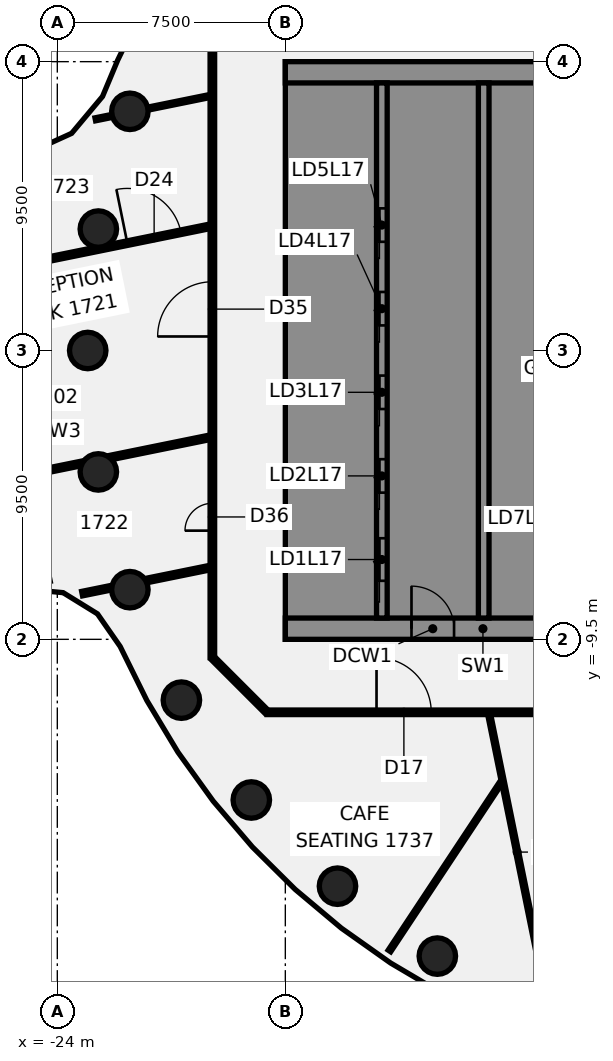
"""IFC4 building model, lengths in metres.
Left out: names, types, materials, properties, quantities, classifications, styles, units other than length and angle.
Written with IfcOpenShell. Run it as: python <this file> out.ifc"""

import sys

from ifc_helpers import new_model, si_unit, direction, frame, frame_2d, origin, origin_2d, place, context, subcontext, project, spatial, polyline, rectangle, circle, outline, extrude, element, fill, save


model = new_model("IFC4")
c1 = context("Model", 3, precision=1e-05, world=origin(), true_north=direction((0.0, 1.0)))
c2 = subcontext(c1, "Body", "Model", "MODEL_VIEW")
j1 = project(units=[si_unit("LENGTHUNIT", "METRE"), si_unit("PLANEANGLEUNIT", "RADIAN")], contexts=[c1])
p1 = place(None, origin())
s1 = spatial("IfcSite", under=j1, at=p1, CompositionType="ELEMENT")
p2 = place(p1, origin())
s2 = spatial("IfcBuilding", under=s1, at=p2, CompositionType="ELEMENT")
p3 = place(p2, frame((0.0, 0.0, 75.25)))
s3 = spatial("IfcBuildingStorey", under=s2, at=p3, CompositionType="ELEMENT", Elevation=75.25)
for number, where, z_axis, x_axis in (
    (1, (-21.613, 7.866, -0.14), (0.0, 0.0, 1.0), (1.0, 0.0, 0.0)),
    (2, (-22.651, 3.994, -0.14), (0.0, 0.0, 1.0), (1.0, 0.0, 0.0)),
    (3, (-23.0, 0.0, -0.14), (0.0, 0.0, 1.0), (1.0, 0.0, 0.0)),
    (4, (-22.651, -3.994, -0.14), (0.0, 0.0, 1.0), (1.0, 0.0, 0.0)),
    (5, (-21.613, -7.866, -0.14), (0.0, 0.0, 1.0), (1.0, 0.0, 0.0)),
    (6, (-19.919, -11.5, -0.14), (0.0, 0.0, 1.0), (1.0, 0.0, 0.0)),
    (7, (-17.619, -14.784, -0.14), (0.0, 0.0, 1.0), (1.0, 0.0, 0.0)),
    (8, (-14.784, -17.619, -0.14), (0.0, 0.0, 1.0), (1.0, 0.0, 0.0)),
    (9, (-11.5, -19.919, -0.14), (0.0, 0.0, 1.0), (1.0, 0.0, 0.0)),
):
    element("IfcColumn", number, at=place(p3, frame(where, z_axis=z_axis, x_axis=x_axis)), inside=s3, PredefinedType="COLUMN", context=c2, shape_type="SweptSolid", body=[
        extrude(circle(Radius=0.6, at=origin_2d()), origin(), (0.0, 0.0, 1.0), 3.71),
    ])
p4 = place(p3, frame((-9.795, -11.969, 0.0), z_axis=(0.0, 0.0, 1.0), x_axis=(0.199208554459, -0.979957117342, 0.0)))
e10 = element("IfcWall", 10, at=p4, inside=s3, PredefinedType="PARTITIONING", context=c2, shape_type="SweptSolid", body=[
    extrude(rectangle(XDim=9.243, YDim=0.1, at=frame_2d((4.622, 0.0))), origin(), (0.0, 0.0, 1.0), 2.97),
])
p5 = place(p3, frame((-18.872, -10.128, 0.0), z_axis=(0.0, 0.0, 1.0), x_axis=(0.707106781187, -0.707106781187, 0.0)))
e11 = element("IfcWall", 11, at=p5, inside=s3, PredefinedType="PARTITIONING", context=c2, shape_type="SweptSolid", body=[
    extrude(rectangle(XDim=2.465, YDim=0.15, at=frame_2d((1.232, 0.0))), origin(), (0.0, 0.0, 1.0), 2.97),
])
p6 = place(p3, frame((-17.1, -11.9, 0.0), z_axis=(0.0, 0.0, 1.0), x_axis=(1.0, 0.0, 0.0)))
e12 = element("IfcWall", 12, at=p6, inside=s3, PredefinedType="PARTITIONING", context=c2, shape_type="SweptSolid", body=[
    extrude(rectangle(XDim=34.165, YDim=0.15, at=frame_2d((17.083, 0.0))), origin(), (0.0, 0.0, 1.0), 2.97),
])
p7 = place(p6, frame((14.127, 0.0, 0.0)))
e13 = element("IfcOpeningElement", 13, at=p7, cuts=e12, PredefinedType="OPENING", context=c2, shape_type="SweptSolid", body=[
    extrude(rectangle(XDim=1.8, YDim=2.1, at=frame_2d((0.9, 1.05))), frame((0.0, 0.085, 0.0), z_axis=(0.0, -1.0, 0.0), x_axis=(1.0, 0.0, 0.0)), (0.0, 0.0, 1.0), 0.17),
])
p8 = place(p6, frame((3.6, 0.0, 0.0)))
e14 = element("IfcOpeningElement", 14, at=p8, cuts=e12, PredefinedType="OPENING", context=c2, shape_type="SweptSolid", body=[
    extrude(rectangle(XDim=1.8, YDim=2.1, at=frame_2d((0.9, 1.05))), frame((0.0, 0.085, 0.0), z_axis=(0.0, -1.0, 0.0), x_axis=(1.0, 0.0, 0.0)), (0.0, 0.0, 1.0), 0.17),
])
p9 = place(p6, frame((27.452, 0.0, 0.0)))
e15 = element("IfcOpeningElement", 15, at=p9, cuts=e12, PredefinedType="OPENING", context=c2, shape_type="SweptSolid", body=[
    extrude(rectangle(XDim=1.8, YDim=2.1, at=frame_2d((0.9, 1.05))), frame((0.0, 0.085, 0.0), z_axis=(0.0, -1.0, 0.0), x_axis=(1.0, 0.0, 0.0)), (0.0, 0.0, 1.0), 0.17),
])
p10 = place(p3, frame((-26.303, 2.595, 0.0), z_axis=(0.0, 0.0, 1.0), x_axis=(0.979950490728, 0.19924114967, 0.0)))
e16 = element("IfcWall", 16, at=p10, inside=s3, PredefinedType="PARTITIONING", context=c2, shape_type="SweptSolid", body=[
    extrude(rectangle(XDim=7.479, YDim=0.15, at=frame_2d((3.74, 0.0))), origin(), (0.0, 0.0, 1.0), 2.87),
])
p11 = place(p10, frame((4.7, 0.0, 0.0)))
e17 = element("IfcOpeningElement", 17, at=p11, cuts=e16, PredefinedType="OPENING", context=c2, shape_type="SweptSolid", body=[
    extrude(rectangle(XDim=1.8, YDim=2.1, at=frame_2d((0.9, 1.05))), frame((0.0, 0.085, 0.0), z_axis=(0.0, -1.0, 0.0), x_axis=(1.0, 0.0, 0.0)), (0.0, 0.0, 1.0), 0.17),
])
p12 = place(p3, frame((-24.948, -4.069, 0.0), z_axis=(0.0, 0.0, 1.0), x_axis=(0.979938907772, 0.199298110967, 0.0)))
e18 = element("IfcWall", 18, at=p12, inside=s3, PredefinedType="PARTITIONING", context=c2, shape_type="SweptSolid", body=[
    extrude(rectangle(XDim=1.8, YDim=0.15, at=frame_2d((0.9, 0.0))), origin(), (0.0, 0.0, 1.0), 2.87),
])
p13 = place(p3, frame((-22.284, -3.527, 0.0), z_axis=(0.0, 0.0, 1.0), x_axis=(0.979950296152, 0.199242106673, 0.0)))
e19 = element("IfcWall", 19, at=p13, inside=s3, PredefinedType="PARTITIONING", context=c2, shape_type="SweptSolid", body=[
    extrude(rectangle(XDim=3.378, YDim=0.15, at=frame_2d((1.689, 0.0))), origin(), (0.0, 0.0, 1.0), 2.97),
])
p14 = place(p3, frame((-22.751, 7.603, 0.0), z_axis=(0.0, 0.0, 1.0), x_axis=(0.980025828953, 0.1988702456, 0.0)))
e20 = element("IfcWall", 20, at=p14, inside=s3, PredefinedType="PARTITIONING", context=c2, shape_type="SweptSolid", body=[
    extrude(rectangle(XDim=0.579, YDim=0.1, at=frame_2d((0.29, 0.0))), origin(), (0.0, 0.0, 1.0), 2.97),
])
p15 = place(p3, frame((-21.026, 7.954, 0.0), z_axis=(0.0, 0.0, 1.0), x_axis=(0.979967824394, 0.19915587652, 0.0)))
e21 = element("IfcWall", 21, at=p15, inside=s3, PredefinedType="PARTITIONING", context=c2, shape_type="SweptSolid", body=[
    extrude(rectangle(XDim=2.1, YDim=0.1, at=frame_2d((1.05, 0.0))), origin(), (0.0, 0.0, 1.0), 2.97),
])
p16 = place(p3, frame((-23.185, -7.997, 0.0), z_axis=(0.0, 0.0, 1.0), x_axis=(0.979965738982, 0.199166137736, 0.0)))
e22 = element("IfcWall", 22, at=p16, inside=s3, PredefinedType="PARTITIONING", context=c2, shape_type="SweptSolid", body=[
    extrude(rectangle(XDim=1.0, YDim=0.15, at=frame_2d((0.5, 0.0))), origin(), (0.0, 0.0, 1.0), 2.97),
])
p17 = place(p3, frame((-21.083, -7.569, 0.0), z_axis=(0.0, 0.0, 1.0), x_axis=(0.979916380724, 0.199408843305, 0.0)))
e23 = element("IfcWall", 23, at=p17, inside=s3, PredefinedType="PARTITIONING", context=c2, shape_type="SweptSolid", body=[
    extrude(rectangle(XDim=2.152, YDim=0.15, at=frame_2d((1.076, 0.0))), origin(), (0.0, 0.0, 1.0), 2.97),
])
p18 = place(p3, frame((-13.076, -19.75, 0.0), z_axis=(0.0, 0.0, 1.0), x_axis=(0.552134654266, 0.833754954144, 0.0)))
e24 = element("IfcWall", 24, at=p18, inside=s3, PredefinedType="PARTITIONING", context=c2, shape_type="SweptSolid", body=[
    extrude(rectangle(XDim=6.639, YDim=0.1, at=frame_2d((3.319, 0.0))), origin(), (0.0, 0.0, 1.0), 2.97),
])
p19 = place(p3, frame((-18.9, -10.1, 0.0), z_axis=(0.0, 0.0, 1.0), x_axis=(0.0, 1.0, 0.0)))
e25 = element("IfcWall", 25, at=p19, inside=s3, PredefinedType="PARTITIONING", context=c2, shape_type="SweptSolid", body=[
    extrude(rectangle(XDim=20.2, YDim=0.15, at=frame_2d((10.1, 0.0))), origin(), (0.0, 0.0, 1.0), 2.97),
])
p20 = place(p19, frame((10.561, 0.0, 0.0)))
e26 = element("IfcOpeningElement", 26, at=p20, cuts=e25, PredefinedType="OPENING", context=c2, shape_type="SweptSolid", body=[
    extrude(rectangle(XDim=1.8, YDim=2.1, at=frame_2d((0.9, 1.05))), frame((0.0, 0.085, 0.0), z_axis=(0.0, -1.0, 0.0), x_axis=(1.0, 0.0, 0.0)), (0.0, 0.0, 1.0), 0.17),
])
p21 = place(p19, frame((4.175, 0.0, 0.0)))
e27 = element("IfcOpeningElement", 27, at=p21, cuts=e25, PredefinedType="OPENING", context=c2, shape_type="SweptSolid", body=[
    extrude(rectangle(XDim=0.9, YDim=2.1, at=frame_2d((0.45, 1.05))), frame((0.0, 0.085, 0.0), z_axis=(0.0, -1.0, 0.0), x_axis=(1.0, 0.0, 0.0)), (0.0, 0.0, 1.0), 0.17),
])
p22 = place(p3, frame((-16.5, -9.15, 0.0), z_axis=(0.0, 0.0, 1.0), x_axis=(1.0, 0.0, 0.0)))
e28 = element("IfcWall", 28, at=p22, inside=s3, PredefinedType="SHEAR", context=c2, shape_type="SweptSolid", body=[
    extrude(rectangle(XDim=13.0, YDim=0.7, at=frame_2d((6.5, 0.0))), origin(), (0.0, 0.0, 1.0), 3.57),
])
p23 = place(p22, frame((4.15, 0.0, 0.0)))
e29 = element("IfcOpeningElement", 29, at=p23, cuts=e28, PredefinedType="OPENING", context=c2, shape_type="SweptSolid", body=[
    extrude(rectangle(XDim=1.4, YDim=2.1, at=frame_2d((0.7, 1.05))), frame((0.0, 0.36, 0.0), z_axis=(0.0, -1.0, 0.0), x_axis=(1.0, 0.0, 0.0)), (0.0, 0.0, 1.0), 0.72),
])
p24 = place(p22, frame((10.125, 0.0, 0.0)))
e30 = element("IfcOpeningElement", 30, at=p24, cuts=e28, PredefinedType="OPENING", context=c2, shape_type="SweptSolid", body=[
    extrude(rectangle(XDim=1.4, YDim=2.1, at=frame_2d((0.7, 1.05))), frame((0.0, 0.36, 0.0), z_axis=(0.0, -1.0, 0.0), x_axis=(1.0, 0.0, 0.0)), (0.0, 0.0, 1.0), 0.72),
])
p25 = place(p3, origin())
e31 = element("IfcWall", 31, at=p25, inside=s3, PredefinedType="SHEAR", context=c2, shape_type="SweptSolid", body=[
    extrude(outline(polyline([(-13.5, -8.8), (-13.5, -8.125), (-15.8, -8.125), (-15.8, -5.625), (-13.5, -5.625), (-13.5, -5.375), (-15.8, -5.375), (-15.8, -2.875), (-13.5, -2.875), (-13.5, -2.625), (-15.8, -2.625), (-15.8, -0.125), (-13.5, -0.125), (-13.5, 0.125), (-15.8, 0.125), (-15.8, 2.625), (-13.5, 2.625), (-13.5, 2.875), (-15.8, 2.875), (-15.8, 5.375), (-13.5, 5.375), (-13.5, 5.625), (-15.8, 5.625), (-15.8, 8.125), (-13.5, 8.125), (-13.5, 8.8), (-15.8, 8.8), (-16.5, 8.8), (-16.5, -8.8), (-15.8, -8.8), (-13.5, -8.8)])), origin(), (0.0, 0.0, 1.0), 3.57),
])
p26 = place(p3, frame((-16.5, 9.15, 0.0), z_axis=(0.0, 0.0, 1.0), x_axis=(1.0, 0.0, 0.0)))
e32 = element("IfcWall", 32, at=p26, inside=s3, PredefinedType="SHEAR", context=c2, shape_type="SweptSolid", body=[
    extrude(rectangle(XDim=13.0, YDim=0.7, at=frame_2d((6.5, 0.0))), origin(), (0.0, 0.0, 1.0), 3.57),
])
p27 = place(p3, origin())
e33 = element("IfcWall", 33, at=p27, inside=s3, PredefinedType="SHEAR", context=c2, shape_type="SweptSolid", body=[
    extrude(outline(polyline([(-9.8, -5.375), (-9.8, -5.625), (-7.5, -5.625), (-7.15, -5.625), (-7.15, 8.8), (-7.5, 8.8), (-9.8, 8.8), (-9.8, 8.125), (-7.5, 8.125), (-7.5, 5.625), (-9.8, 5.625), (-9.8, 5.375), (-7.5, 5.375), (-7.5, 2.875), (-9.8, 2.875), (-9.8, 2.625), (-7.5, 2.625), (-7.5, 0.125), (-9.8, 0.125), (-9.8, -0.125), (-7.5, -0.125), (-7.5, -2.625), (-9.8, -2.625), (-9.8, -2.875), (-7.5, -2.875), (-7.5, -5.375), (-9.8, -5.375)])), origin(), (0.0, 0.0, 1.0), 3.57),
])
p28 = place(p3, origin())
e34 = element("IfcWall", 34, at=p28, inside=s3, PredefinedType="SHEAR", context=c2, shape_type="SweptSolid", body=[
    extrude(outline(polyline([(-7.5, -8.125), (-9.55, -8.125), (-9.55, -5.625), (-9.8, -5.625), (-9.8, -8.125), (-9.8, -8.8), (-7.5, -8.8), (-7.5, -8.125)])), origin(), (0.0, 0.0, 1.0), 3.57),
])
p29 = place(p3, frame((-13.325, -8.8, 0.0), z_axis=(0.0, 0.0, 1.0), x_axis=(0.0, 1.0, 0.0)))
e35 = element("IfcWall", 35, at=p29, inside=s3, PredefinedType="SHEAR", context=c2, shape_type="SweptSolid", body=[
    extrude(rectangle(XDim=17.6, YDim=0.35, at=frame_2d((8.8, 0.0))), origin(), (0.0, 0.0, 1.0), 3.57),
])
p30 = place(p29, frame((1.225, 0.0, 0.0)))
e36 = element("IfcOpeningElement", 36, at=p30, cuts=e35, PredefinedType="OPENING", context=c2, shape_type="SweptSolid", body=[
    extrude(rectangle(XDim=1.4, YDim=2.1, at=frame_2d((0.7, 1.05))), frame((0.0, 0.185, 0.0), z_axis=(0.0, -1.0, 0.0), x_axis=(1.0, 0.0, 0.0)), (0.0, 0.0, 1.0), 0.37),
])
p31 = place(p29, frame((4.125, 0.0, 0.0)))
e37 = element("IfcOpeningElement", 37, at=p31, cuts=e35, PredefinedType="OPENING", context=c2, shape_type="SweptSolid", body=[
    extrude(rectangle(XDim=1.1, YDim=2.1, at=frame_2d((0.55, 1.05))), frame((0.0, 0.185, 0.0), z_axis=(0.0, -1.0, 0.0), x_axis=(1.0, 0.0, 0.0)), (0.0, 0.0, 1.0), 0.37),
])
p32 = place(p29, frame((6.875, 0.0, 0.0)))
e38 = element("IfcOpeningElement", 38, at=p32, cuts=e35, PredefinedType="OPENING", context=c2, shape_type="SweptSolid", body=[
    extrude(rectangle(XDim=1.1, YDim=2.1, at=frame_2d((0.55, 1.05))), frame((0.0, 0.185, 0.0), z_axis=(0.0, -1.0, 0.0), x_axis=(1.0, 0.0, 0.0)), (0.0, 0.0, 1.0), 0.37),
])
p33 = place(p29, frame((9.625, 0.0, 0.0)))
e39 = element("IfcOpeningElement", 39, at=p33, cuts=e35, PredefinedType="OPENING", context=c2, shape_type="SweptSolid", body=[
    extrude(rectangle(XDim=1.1, YDim=2.1, at=frame_2d((0.55, 1.05))), frame((0.0, 0.185, 0.0), z_axis=(0.0, -1.0, 0.0), x_axis=(1.0, 0.0, 0.0)), (0.0, 0.0, 1.0), 0.37),
])
p34 = place(p29, frame((12.375, 0.0, 0.0)))
e40 = element("IfcOpeningElement", 40, at=p34, cuts=e35, PredefinedType="OPENING", context=c2, shape_type="SweptSolid", body=[
    extrude(rectangle(XDim=1.1, YDim=2.1, at=frame_2d((0.55, 1.05))), frame((0.0, 0.185, 0.0), z_axis=(0.0, -1.0, 0.0), x_axis=(1.0, 0.0, 0.0)), (0.0, 0.0, 1.0), 0.37),
])
p35 = place(p3, frame((-9.975, -8.8, 0.0), z_axis=(0.0, 0.0, 1.0), x_axis=(0.0, 1.0, 0.0)))
e41 = element("IfcWall", 41, at=p35, inside=s3, PredefinedType="SHEAR", context=c2, shape_type="SweptSolid", body=[
    extrude(rectangle(XDim=17.6, YDim=0.35, at=frame_2d((8.8, 0.0))), origin(), (0.0, 0.0, 1.0), 3.57),
])
p36 = place(p8, frame((1.8, 0.0, 0.0), z_axis=(0.0, 0.0, 1.0), x_axis=(-1.0, 0.0, 0.0)))
e42 = element("IfcDoor", 42, at=p36, inside=s3, OperationType="DOUBLE_DOOR_SINGLE_SWING", PredefinedType="DOOR", context=c2, shape_type="SweptSolid", body=[
    extrude(rectangle(XDim=1.8, YDim=2.1, at=frame_2d((0.9, 1.05))), frame((0.0, 0.025, 0.0), z_axis=(0.0, -1.0, 0.0), x_axis=(1.0, 0.0, 0.0)), (0.0, 0.0, 1.0), 0.05),
])
fill(e14, e42)
p37 = place(p11, origin())
e43 = element("IfcDoor", 43, at=p37, inside=s3, OperationType="DOUBLE_DOOR_SINGLE_SWING", PredefinedType="DOOR", context=c2, shape_type="SweptSolid", body=[
    extrude(rectangle(XDim=1.8, YDim=2.1, at=frame_2d((0.9, 1.05))), frame((0.0, 0.025, 0.0), z_axis=(0.0, -1.0, 0.0), x_axis=(1.0, 0.0, 0.0)), (0.0, 0.0, 1.0), 0.05),
])
fill(e17, e43)
p38 = place(p20, frame((1.8, 0.0, 0.0), z_axis=(0.0, 0.0, 1.0), x_axis=(-1.0, 0.0, 0.0)))
e44 = element("IfcDoor", 44, at=p38, inside=s3, OperationType="DOUBLE_DOOR_SINGLE_SWING", PredefinedType="DOOR", context=c2, shape_type="SweptSolid", body=[
    extrude(rectangle(XDim=1.8, YDim=2.1, at=frame_2d((0.9, 1.05))), frame((0.0, 0.025, 0.0), z_axis=(0.0, -1.0, 0.0), x_axis=(1.0, 0.0, 0.0)), (0.0, 0.0, 1.0), 0.05),
])
fill(e26, e44)
p39 = place(p21, origin())
e45 = element("IfcDoor", 45, at=p39, inside=s3, OperationType="SINGLE_SWING_RIGHT", PredefinedType="DOOR", context=c2, shape_type="SweptSolid", body=[
    extrude(rectangle(XDim=0.9, YDim=2.1, at=frame_2d((0.45, 1.05))), frame((0.0, 0.025, 0.0), z_axis=(0.0, -1.0, 0.0), x_axis=(1.0, 0.0, 0.0)), (0.0, 0.0, 1.0), 0.05),
])
fill(e27, e45)
p40 = place(p23, origin())
e46 = element("IfcDoor", 46, at=p40, inside=s3, OperationType="SINGLE_SWING_LEFT", PredefinedType="DOOR", context=c2, shape_type="SweptSolid", body=[
    extrude(rectangle(XDim=1.4, YDim=2.1, at=frame_2d((0.7, 1.05))), frame((0.0, 0.025, 0.0), z_axis=(0.0, -1.0, 0.0), x_axis=(1.0, 0.0, 0.0)), (0.0, 0.0, 1.0), 0.05),
])
fill(e29, e46)
p41 = place(p30, origin())
e47 = element("IfcDoor", 47, at=p41, inside=s3, OperationType="SLIDING_TO_LEFT", PredefinedType="DOOR", context=c2, shape_type="SweptSolid", body=[
    extrude(rectangle(XDim=1.4, YDim=2.1, at=frame_2d((0.7, 1.05))), frame((0.0, 0.025, 0.0), z_axis=(0.0, -1.0, 0.0), x_axis=(1.0, 0.0, 0.0)), (0.0, 0.0, 1.0), 0.05),
])
fill(e36, e47)
p42 = place(p31, origin())
e48 = element("IfcDoor", 48, at=p42, inside=s3, OperationType="SLIDING_TO_LEFT", PredefinedType="DOOR", context=c2, shape_type="SweptSolid", body=[
    extrude(rectangle(XDim=1.1, YDim=2.1, at=frame_2d((0.55, 1.05))), frame((0.0, 0.025, 0.0), z_axis=(0.0, -1.0, 0.0), x_axis=(1.0, 0.0, 0.0)), (0.0, 0.0, 1.0), 0.05),
])
fill(e37, e48)
p43 = place(p32, origin())
e49 = element("IfcDoor", 49, at=p43, inside=s3, OperationType="SLIDING_TO_LEFT", PredefinedType="DOOR", context=c2, shape_type="SweptSolid", body=[
    extrude(rectangle(XDim=1.1, YDim=2.1, at=frame_2d((0.55, 1.05))), frame((0.0, 0.025, 0.0), z_axis=(0.0, -1.0, 0.0), x_axis=(1.0, 0.0, 0.0)), (0.0, 0.0, 1.0), 0.05),
])
fill(e38, e49)
p44 = place(p33, origin())
e50 = element("IfcDoor", 50, at=p44, inside=s3, OperationType="SLIDING_TO_LEFT", PredefinedType="DOOR", context=c2, shape_type="SweptSolid", body=[
    extrude(rectangle(XDim=1.1, YDim=2.1, at=frame_2d((0.55, 1.05))), frame((0.0, 0.025, 0.0), z_axis=(0.0, -1.0, 0.0), x_axis=(1.0, 0.0, 0.0)), (0.0, 0.0, 1.0), 0.05),
])
fill(e39, e50)
p45 = place(p34, origin())
e51 = element("IfcDoor", 51, at=p45, inside=s3, OperationType="SLIDING_TO_LEFT", PredefinedType="DOOR", context=c2, shape_type="SweptSolid", body=[
    extrude(rectangle(XDim=1.1, YDim=2.1, at=frame_2d((0.55, 1.05))), frame((0.0, 0.025, 0.0), z_axis=(0.0, -1.0, 0.0), x_axis=(1.0, 0.0, 0.0)), (0.0, 0.0, 1.0), 0.05),
])
fill(e40, e51)
save(model, sys.argv[1])
